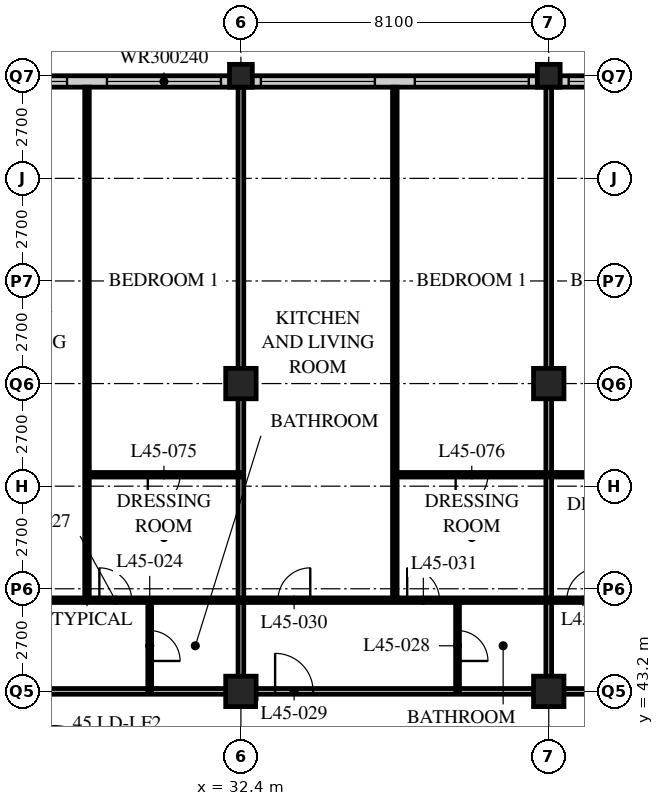
"""IFC4 building model, lengths in metres.
Left out: names, types, materials, properties, quantities, classifications, styles, units other than length and angle.
Written with IfcOpenShell. Run it as: python <this file> out.ifc"""

import sys

from ifc_helpers import new_model, si_unit, direction, frame, frame_2d, origin, origin_2d, place, context, subcontext, project, spatial, rectangle, hollow_rectangle, extrude, element, fill, save


model = new_model("IFC4")
c1 = context("Model", 3, precision=1e-05, world=origin(), true_north=direction((0.0, 1.0)))
c2 = subcontext(c1, "Body", "Model", "MODEL_VIEW")
j1 = project(units=[si_unit("LENGTHUNIT", "METRE"), si_unit("PLANEANGLEUNIT", "RADIAN")], contexts=[c1])
p1 = place(None, origin())
s1 = spatial("IfcSite", under=j1, at=p1, CompositionType="ELEMENT")
p2 = place(p1, origin())
s2 = spatial("IfcBuilding", under=s1, at=p2, CompositionType="ELEMENT")
p3 = place(p2, frame((0.0, 0.0, 177.6)))
s3 = spatial("IfcBuildingStorey", under=s2, at=p3, CompositionType="ELEMENT", Elevation=177.6)
for number, where, z_axis, x_axis in (
    (1, (32.4, 43.2, 0.0), (0.0, 0.0, 1.0), (1.0, 0.0, 0.0)),
    (2, (32.4, 51.3, 0.0), (0.0, 0.0, 1.0), (1.0, 0.0, 0.0)),
):
    element("IfcColumn", number, at=place(p3, frame(where, z_axis=z_axis, x_axis=x_axis)), inside=s3, PredefinedType="COLUMN", context=c2, shape_type="SweptSolid", body=[
        extrude(hollow_rectangle(XDim=0.8, YDim=0.8, WallThickness=0.08, at=origin_2d()), origin(), (0.0, 0.0, 1.0), 3.6),
    ])
p4 = place(p3, frame((32.4, 59.4, 0.0), z_axis=(0.0, 0.0, 1.0), x_axis=(1.0, 0.0, 0.0)))
e3 = element("IfcColumn", 3, at=p4, inside=s3, PredefinedType="COLUMN", context=c2, shape_type="SweptSolid", body=[
    extrude(hollow_rectangle(XDim=0.6, YDim=0.6, WallThickness=0.05, at=origin_2d()), origin(), (0.0, 0.0, 1.0), 3.6),
])
for number, where, z_axis, x_axis in (
    (4, (40.5, 43.2, 0.0), (0.0, 0.0, 1.0), (1.0, 0.0, 0.0)),
    (5, (40.5, 51.3, 0.0), (0.0, 0.0, 1.0), (1.0, 0.0, 0.0)),
):
    element("IfcColumn", number, at=place(p3, frame(where, z_axis=z_axis, x_axis=x_axis)), inside=s3, PredefinedType="COLUMN", context=c2, shape_type="SweptSolid", body=[
        extrude(hollow_rectangle(XDim=0.8, YDim=0.8, WallThickness=0.08, at=origin_2d()), origin(), (0.0, 0.0, 1.0), 3.6),
    ])
p5 = place(p3, frame((40.5, 59.4, 0.0), z_axis=(0.0, 0.0, 1.0), x_axis=(1.0, 0.0, 0.0)))
e6 = element("IfcColumn", 6, at=p5, inside=s3, PredefinedType="COLUMN", context=c2, shape_type="SweptSolid", body=[
    extrude(hollow_rectangle(XDim=0.6, YDim=0.6, WallThickness=0.05, at=origin_2d()), origin(), (0.0, 0.0, 1.0), 3.6),
])
p6 = place(p3, frame((48.3, 59.25, 0.0), z_axis=(0.0, 0.0, 1.0), x_axis=(-1.0, 0.0, 0.0)))
e7 = element("IfcWall", 7, at=p6, inside=s3, PredefinedType="SOLIDWALL", context=c2, shape_type="SweptSolid", body=[
    extrude(rectangle(XDim=40.2, YDim=0.3, at=frame_2d((20.1, 0.0))), origin(), (0.0, 0.0, 1.0), 3.39),
])
p7 = place(p6, frame((0.225, 0.0, 0.6)))
e8 = element("IfcOpeningElement", 8, at=p7, cuts=e7, PredefinedType="OPENING", context=c2, shape_type="SweptSolid", body=[
    extrude(rectangle(XDim=3.0, YDim=2.4, at=frame_2d((1.5, 1.2))), frame((0.0, 0.16, 0.0), z_axis=(0.0, -1.0, 0.0), x_axis=(1.0, 0.0, 0.0)), (0.0, 0.0, 1.0), 0.32),
])
p8 = place(p6, frame((4.275, 0.0, 0.6)))
e9 = element("IfcOpeningElement", 9, at=p8, cuts=e7, PredefinedType="OPENING", context=c2, shape_type="SweptSolid", body=[
    extrude(rectangle(XDim=3.0, YDim=2.4, at=frame_2d((1.5, 1.2))), frame((0.0, 0.16, 0.0), z_axis=(0.0, -1.0, 0.0), x_axis=(1.0, 0.0, 0.0)), (0.0, 0.0, 1.0), 0.32),
])
p9 = place(p6, frame((8.325, 0.0, 0.6)))
e10 = element("IfcOpeningElement", 10, at=p9, cuts=e7, PredefinedType="OPENING", context=c2, shape_type="SweptSolid", body=[
    extrude(rectangle(XDim=3.0, YDim=2.4, at=frame_2d((1.5, 1.2))), frame((0.0, 0.16, 0.0), z_axis=(0.0, -1.0, 0.0), x_axis=(1.0, 0.0, 0.0)), (0.0, 0.0, 1.0), 0.32),
])
p10 = place(p6, frame((12.375, 0.0, 0.6)))
e11 = element("IfcOpeningElement", 11, at=p10, cuts=e7, PredefinedType="OPENING", context=c2, shape_type="SweptSolid", body=[
    extrude(rectangle(XDim=3.0, YDim=2.4, at=frame_2d((1.5, 1.2))), frame((0.0, 0.16, 0.0), z_axis=(0.0, -1.0, 0.0), x_axis=(1.0, 0.0, 0.0)), (0.0, 0.0, 1.0), 0.32),
])
p11 = place(p6, frame((16.425, 0.0, 0.6)))
e12 = element("IfcOpeningElement", 12, at=p11, cuts=e7, PredefinedType="OPENING", context=c2, shape_type="SweptSolid", body=[
    extrude(rectangle(XDim=3.0, YDim=2.4, at=frame_2d((1.5, 1.2))), frame((0.0, 0.16, 0.0), z_axis=(0.0, -1.0, 0.0), x_axis=(1.0, 0.0, 0.0)), (0.0, 0.0, 1.0), 0.32),
])
p12 = place(p6, frame((20.475, 0.0, 0.6)))
e13 = element("IfcOpeningElement", 13, at=p12, cuts=e7, PredefinedType="OPENING", context=c2, shape_type="SweptSolid", body=[
    extrude(rectangle(XDim=3.0, YDim=2.4, at=frame_2d((1.5, 1.2))), frame((0.0, 0.16, 0.0), z_axis=(0.0, -1.0, 0.0), x_axis=(1.0, 0.0, 0.0)), (0.0, 0.0, 1.0), 0.32),
])
p13 = place(p6, frame((24.525, 0.0, 0.6)))
e14 = element("IfcOpeningElement", 14, at=p13, cuts=e7, PredefinedType="OPENING", context=c2, shape_type="SweptSolid", body=[
    extrude(rectangle(XDim=3.0, YDim=2.4, at=frame_2d((1.5, 1.2))), frame((0.0, 0.16, 0.0), z_axis=(0.0, -1.0, 0.0), x_axis=(1.0, 0.0, 0.0)), (0.0, 0.0, 1.0), 0.32),
])
p14 = place(p6, frame((28.575, 0.0, 0.6)))
e15 = element("IfcOpeningElement", 15, at=p14, cuts=e7, PredefinedType="OPENING", context=c2, shape_type="SweptSolid", body=[
    extrude(rectangle(XDim=3.0, YDim=2.4, at=frame_2d((1.5, 1.2))), frame((0.0, 0.16, 0.0), z_axis=(0.0, -1.0, 0.0), x_axis=(1.0, 0.0, 0.0)), (0.0, 0.0, 1.0), 0.32),
])
p15 = place(p6, frame((32.625, 0.0, 0.6)))
e16 = element("IfcOpeningElement", 16, at=p15, cuts=e7, PredefinedType="OPENING", context=c2, shape_type="SweptSolid", body=[
    extrude(rectangle(XDim=3.0, YDim=2.4, at=frame_2d((1.5, 1.2))), frame((0.0, 0.16, 0.0), z_axis=(0.0, -1.0, 0.0), x_axis=(1.0, 0.0, 0.0)), (0.0, 0.0, 1.0), 0.32),
])
p16 = place(p6, frame((36.675, 0.0, 0.6)))
e17 = element("IfcOpeningElement", 17, at=p16, cuts=e7, PredefinedType="OPENING", context=c2, shape_type="SweptSolid", body=[
    extrude(rectangle(XDim=3.0, YDim=2.4, at=frame_2d((1.5, 1.2))), frame((0.0, 0.16, 0.0), z_axis=(0.0, -1.0, 0.0), x_axis=(1.0, 0.0, 0.0)), (0.0, 0.0, 1.0), 0.32),
])
p17 = place(p3, frame((12.15, 43.2, 0.0), z_axis=(0.0, 0.0, 1.0), x_axis=(1.0, 0.0, 0.0)))
e18 = element("IfcWall", 18, at=p17, inside=s3, PredefinedType="PARTITIONING", context=c2, shape_type="SweptSolid", body=[
    extrude(rectangle(XDim=32.4, YDim=0.15, at=frame_2d((16.2, 0.0))), origin(), (0.0, 0.0, 1.0), 2.778),
])
p18 = place(p17, frame((4.95, 0.0, 0.0)))
e19 = element("IfcOpeningElement", 19, at=p18, cuts=e18, PredefinedType="OPENING", context=c2, shape_type="SweptSolid", body=[
    extrude(rectangle(XDim=1.0, YDim=2.1, at=frame_2d((0.5, 1.05))), frame((0.0, 0.085, 0.0), z_axis=(0.0, -1.0, 0.0), x_axis=(1.0, 0.0, 0.0)), (0.0, 0.0, 1.0), 0.17),
])
p19 = place(p17, frame((13.05, 0.0, 0.0)))
e20 = element("IfcOpeningElement", 20, at=p19, cuts=e18, PredefinedType="OPENING", context=c2, shape_type="SweptSolid", body=[
    extrude(rectangle(XDim=1.0, YDim=2.1, at=frame_2d((0.5, 1.05))), frame((0.0, 0.085, 0.0), z_axis=(0.0, -1.0, 0.0), x_axis=(1.0, 0.0, 0.0)), (0.0, 0.0, 1.0), 0.17),
])
p20 = place(p17, frame((21.15, 0.0, 0.0)))
e21 = element("IfcOpeningElement", 21, at=p20, cuts=e18, PredefinedType="OPENING", context=c2, shape_type="SweptSolid", body=[
    extrude(rectangle(XDim=1.0, YDim=2.1, at=frame_2d((0.5, 1.05))), frame((0.0, 0.085, 0.0), z_axis=(0.0, -1.0, 0.0), x_axis=(1.0, 0.0, 0.0)), (0.0, 0.0, 1.0), 0.17),
])
p21 = place(p17, frame((29.875, 0.0, 0.0)))
e22 = element("IfcOpeningElement", 22, at=p21, cuts=e18, PredefinedType="OPENING", context=c2, shape_type="SweptSolid", body=[
    extrude(rectangle(XDim=1.0, YDim=2.1, at=frame_2d((0.5, 1.05))), frame((0.0, 0.085, 0.0), z_axis=(0.0, -1.0, 0.0), x_axis=(1.0, 0.0, 0.0)), (0.0, 0.0, 1.0), 0.17),
])
p22 = place(p17, frame((1.525, 0.0, 0.0)))
e23 = element("IfcOpeningElement", 23, at=p22, cuts=e18, PredefinedType="OPENING", context=c2, shape_type="SweptSolid", body=[
    extrude(rectangle(XDim=1.0, YDim=2.1, at=frame_2d((0.5, 1.05))), frame((0.0, 0.085, 0.0), z_axis=(0.0, -1.0, 0.0), x_axis=(1.0, 0.0, 0.0)), (0.0, 0.0, 1.0), 0.17),
])
p23 = place(p3, frame((30.0, 43.2, 0.0), z_axis=(0.0, 0.0, 1.0), x_axis=(0.0, 1.0, 0.0)))
e24 = element("IfcWall", 24, at=p23, inside=s3, PredefinedType="PARTITIONING", context=c2, shape_type="SweptSolid", body=[
    extrude(rectangle(XDim=2.4, YDim=0.1, at=frame_2d((1.2, 0.0))), origin(), (0.0, 0.0, 1.0), 3.39),
])
p24 = place(p23, frame((0.8, 0.0, 0.0)))
e25 = element("IfcOpeningElement", 25, at=p24, cuts=e24, PredefinedType="OPENING", context=c2, shape_type="SweptSolid", body=[
    extrude(rectangle(XDim=0.8, YDim=2.1, at=frame_2d((0.4, 1.05))), frame((0.0, 0.06, 0.0), z_axis=(0.0, -1.0, 0.0), x_axis=(1.0, 0.0, 0.0)), (0.0, 0.0, 1.0), 0.12),
])
p25 = place(p3, frame((28.35, 45.6, 0.0), z_axis=(0.0, 0.0, 1.0), x_axis=(0.0, 1.0, 0.0)))
e26 = element("IfcWall", 26, at=p25, inside=s3, PredefinedType="PARTITIONING", context=c2, shape_type="SweptSolid", body=[
    extrude(rectangle(XDim=13.5, YDim=0.12, at=frame_2d((6.75, 0.0))), origin(), (0.0, 0.0, 1.0), 3.39),
])
p26 = place(p3, frame((32.4, 43.2, 0.0), z_axis=(0.0, 0.0, 1.0), x_axis=(0.0, 1.0, 0.0)))
e27 = element("IfcWall", 27, at=p26, inside=s3, PredefinedType="PARTITIONING", context=c2, shape_type="SweptSolid", body=[
    extrude(rectangle(XDim=15.9, YDim=0.15, at=frame_2d((7.95, 0.0))), origin(), (0.0, 0.0, 1.0), 2.778),
])
p27 = place(p3, frame((38.1, 43.2, 0.0), z_axis=(0.0, 0.0, 1.0), x_axis=(0.0, 1.0, 0.0)))
e28 = element("IfcWall", 28, at=p27, inside=s3, PredefinedType="PARTITIONING", context=c2, shape_type="SweptSolid", body=[
    extrude(rectangle(XDim=2.4, YDim=0.1, at=frame_2d((1.2, 0.0))), origin(), (0.0, 0.0, 1.0), 3.39),
])
p28 = place(p27, frame((0.8, 0.0, 0.0)))
e29 = element("IfcOpeningElement", 29, at=p28, cuts=e28, PredefinedType="OPENING", context=c2, shape_type="SweptSolid", body=[
    extrude(rectangle(XDim=0.8, YDim=2.1, at=frame_2d((0.4, 1.05))), frame((0.0, 0.06, 0.0), z_axis=(0.0, -1.0, 0.0), x_axis=(1.0, 0.0, 0.0)), (0.0, 0.0, 1.0), 0.12),
])
p29 = place(p3, frame((36.45, 45.6, 0.0), z_axis=(0.0, 0.0, 1.0), x_axis=(0.0, 1.0, 0.0)))
e30 = element("IfcWall", 30, at=p29, inside=s3, PredefinedType="PARTITIONING", context=c2, shape_type="SweptSolid", body=[
    extrude(rectangle(XDim=13.5, YDim=0.12, at=frame_2d((6.75, 0.0))), origin(), (0.0, 0.0, 1.0), 3.39),
])
p30 = place(p3, frame((40.5, 43.2, 0.0), z_axis=(0.0, 0.0, 1.0), x_axis=(0.0, 1.0, 0.0)))
e31 = element("IfcWall", 31, at=p30, inside=s3, PredefinedType="PARTITIONING", context=c2, shape_type="SweptSolid", body=[
    extrude(rectangle(XDim=15.9, YDim=0.15, at=frame_2d((7.95, 0.0))), origin(), (0.0, 0.0, 1.0), 2.778),
])
p31 = place(p3, frame((8.15, 45.6, 0.0), z_axis=(0.0, 0.0, 1.0), x_axis=(1.0, 0.0, 0.0)))
e32 = element("IfcWall", 32, at=p31, inside=s3, PredefinedType="PARTITIONING", context=c2, shape_type="SweptSolid", body=[
    extrude(rectangle(XDim=40.4, YDim=0.12, at=frame_2d((20.2, 0.0))), origin(), (0.0, 0.0, 1.0), 3.39),
])
p32 = place(p31, frame((9.025, 0.0, 0.0)))
e33 = element("IfcOpeningElement", 33, at=p32, cuts=e32, PredefinedType="OPENING", context=c2, shape_type="SweptSolid", body=[
    extrude(rectangle(XDim=0.85, YDim=2.1, at=frame_2d((0.425, 1.05))), frame((0.0, 0.07, 0.0), z_axis=(0.0, -1.0, 0.0), x_axis=(1.0, 0.0, 0.0)), (0.0, 0.0, 1.0), 0.14),
])
p33 = place(p31, frame((12.425, 0.0, 0.0)))
e34 = element("IfcOpeningElement", 34, at=p33, cuts=e32, PredefinedType="OPENING", context=c2, shape_type="SweptSolid", body=[
    extrude(rectangle(XDim=0.85, YDim=2.1, at=frame_2d((0.425, 1.05))), frame((0.0, 0.07, 0.0), z_axis=(0.0, -1.0, 0.0), x_axis=(1.0, 0.0, 0.0)), (0.0, 0.0, 1.0), 0.14),
])
p34 = place(p31, frame((17.125, 0.0, 0.0)))
e35 = element("IfcOpeningElement", 35, at=p34, cuts=e32, PredefinedType="OPENING", context=c2, shape_type="SweptSolid", body=[
    extrude(rectangle(XDim=0.85, YDim=2.1, at=frame_2d((0.425, 1.05))), frame((0.0, 0.07, 0.0), z_axis=(0.0, -1.0, 0.0), x_axis=(1.0, 0.0, 0.0)), (0.0, 0.0, 1.0), 0.14),
])
p35 = place(p31, frame((20.525, 0.0, 0.0)))
e36 = element("IfcOpeningElement", 36, at=p35, cuts=e32, PredefinedType="OPENING", context=c2, shape_type="SweptSolid", body=[
    extrude(rectangle(XDim=0.85, YDim=2.1, at=frame_2d((0.425, 1.05))), frame((0.0, 0.07, 0.0), z_axis=(0.0, -1.0, 0.0), x_axis=(1.0, 0.0, 0.0)), (0.0, 0.0, 1.0), 0.14),
])
p36 = place(p31, frame((25.225, 0.0, 0.0)))
e37 = element("IfcOpeningElement", 37, at=p36, cuts=e32, PredefinedType="OPENING", context=c2, shape_type="SweptSolid", body=[
    extrude(rectangle(XDim=0.85, YDim=2.1, at=frame_2d((0.425, 1.05))), frame((0.0, 0.07, 0.0), z_axis=(0.0, -1.0, 0.0), x_axis=(1.0, 0.0, 0.0)), (0.0, 0.0, 1.0), 0.14),
])
p37 = place(p31, frame((28.625, 0.0, 0.0)))
e38 = element("IfcOpeningElement", 38, at=p37, cuts=e32, PredefinedType="OPENING", context=c2, shape_type="SweptSolid", body=[
    extrude(rectangle(XDim=0.85, YDim=2.1, at=frame_2d((0.425, 1.05))), frame((0.0, 0.07, 0.0), z_axis=(0.0, -1.0, 0.0), x_axis=(1.0, 0.0, 0.0)), (0.0, 0.0, 1.0), 0.14),
])
p38 = place(p31, frame((32.825, 0.0, 0.0)))
e39 = element("IfcOpeningElement", 39, at=p38, cuts=e32, PredefinedType="OPENING", context=c2, shape_type="SweptSolid", body=[
    extrude(rectangle(XDim=0.85, YDim=2.1, at=frame_2d((0.425, 1.05))), frame((0.0, 0.07, 0.0), z_axis=(0.0, -1.0, 0.0), x_axis=(1.0, 0.0, 0.0)), (0.0, 0.0, 1.0), 0.14),
])
p39 = place(p31, frame((36.675, 0.0, 0.0)))
e40 = element("IfcOpeningElement", 40, at=p39, cuts=e32, PredefinedType="OPENING", context=c2, shape_type="SweptSolid", body=[
    extrude(rectangle(XDim=0.85, YDim=2.1, at=frame_2d((0.425, 1.05))), frame((0.0, 0.07, 0.0), z_axis=(0.0, -1.0, 0.0), x_axis=(1.0, 0.0, 0.0)), (0.0, 0.0, 1.0), 0.14),
])
p40 = place(p31, frame((6.725, 0.0, 0.0)))
e41 = element("IfcOpeningElement", 41, at=p40, cuts=e32, PredefinedType="OPENING", context=c2, shape_type="SweptSolid", body=[
    extrude(rectangle(XDim=0.85, YDim=2.1, at=frame_2d((0.425, 1.05))), frame((0.0, 0.07, 0.0), z_axis=(0.0, -1.0, 0.0), x_axis=(1.0, 0.0, 0.0)), (0.0, 0.0, 1.0), 0.14),
])
p41 = place(p31, frame((2.875, 0.0, 0.0)))
e42 = element("IfcOpeningElement", 42, at=p41, cuts=e32, PredefinedType="OPENING", context=c2, shape_type="SweptSolid", body=[
    extrude(rectangle(XDim=0.85, YDim=2.1, at=frame_2d((0.425, 1.05))), frame((0.0, 0.07, 0.0), z_axis=(0.0, -1.0, 0.0), x_axis=(1.0, 0.0, 0.0)), (0.0, 0.0, 1.0), 0.14),
])
p42 = place(p3, frame((28.35, 48.9, 0.0), z_axis=(0.0, 0.0, 1.0), x_axis=(1.0, 0.0, 0.0)))
e43 = element("IfcWall", 43, at=p42, inside=s3, PredefinedType="PARTITIONING", context=c2, shape_type="SweptSolid", body=[
    extrude(rectangle(XDim=4.05, YDim=0.12, at=frame_2d((2.025, 0.0))), origin(), (0.0, 0.0, 1.0), 3.39),
])
p43 = place(p42, frame((1.6, 0.0, 0.0)))
e44 = element("IfcOpeningElement", 44, at=p43, cuts=e43, PredefinedType="OPENING", context=c2, shape_type="SweptSolid", body=[
    extrude(rectangle(XDim=0.85, YDim=2.1, at=frame_2d((0.425, 1.05))), frame((0.0, 0.07, 0.0), z_axis=(0.0, -1.0, 0.0), x_axis=(1.0, 0.0, 0.0)), (0.0, 0.0, 1.0), 0.14),
])
p44 = place(p3, frame((36.45, 48.9, 0.0), z_axis=(0.0, 0.0, 1.0), x_axis=(1.0, 0.0, 0.0)))
e45 = element("IfcWall", 45, at=p44, inside=s3, PredefinedType="PARTITIONING", context=c2, shape_type="SweptSolid", body=[
    extrude(rectangle(XDim=8.1, YDim=0.12, at=frame_2d((4.05, 0.0))), origin(), (0.0, 0.0, 1.0), 3.39),
])
p45 = place(p44, frame((1.6, 0.0, 0.0)))
e46 = element("IfcOpeningElement", 46, at=p45, cuts=e45, PredefinedType="OPENING", context=c2, shape_type="SweptSolid", body=[
    extrude(rectangle(XDim=0.85, YDim=2.1, at=frame_2d((0.425, 1.05))), frame((0.0, 0.07, 0.0), z_axis=(0.0, -1.0, 0.0), x_axis=(1.0, 0.0, 0.0)), (0.0, 0.0, 1.0), 0.14),
])
p46 = place(p44, frame((5.65, 0.0, 0.0)))
e47 = element("IfcOpeningElement", 47, at=p46, cuts=e45, PredefinedType="OPENING", context=c2, shape_type="SweptSolid", body=[
    extrude(rectangle(XDim=0.85, YDim=2.1, at=frame_2d((0.425, 1.05))), frame((0.0, 0.07, 0.0), z_axis=(0.0, -1.0, 0.0), x_axis=(1.0, 0.0, 0.0)), (0.0, 0.0, 1.0), 0.14),
])
p47 = place(p8, origin())
e48 = element("IfcWindow", 48, at=p47, inside=s3, PartitioningType="SINGLE_PANEL", PredefinedType="WINDOW", context=c2, shape_type="SweptSolid", body=[
    extrude(rectangle(XDim=3.0, YDim=2.4, at=frame_2d((1.5, 1.2))), frame((0.0, 0.03, 0.0), z_axis=(0.0, -1.0, 0.0), x_axis=(1.0, 0.0, 0.0)), (0.0, 0.0, 1.0), 0.06),
])
fill(e9, e48)
p48 = place(p9, origin())
e49 = element("IfcWindow", 49, at=p48, inside=s3, PartitioningType="SINGLE_PANEL", PredefinedType="WINDOW", context=c2, shape_type="SweptSolid", body=[
    extrude(rectangle(XDim=3.0, YDim=2.4, at=frame_2d((1.5, 1.2))), frame((0.0, 0.03, 0.0), z_axis=(0.0, -1.0, 0.0), x_axis=(1.0, 0.0, 0.0)), (0.0, 0.0, 1.0), 0.06),
])
fill(e10, e49)
p49 = place(p10, origin())
e50 = element("IfcWindow", 50, at=p49, inside=s3, PartitioningType="SINGLE_PANEL", PredefinedType="WINDOW", context=c2, shape_type="SweptSolid", body=[
    extrude(rectangle(XDim=3.0, YDim=2.4, at=frame_2d((1.5, 1.2))), frame((0.0, 0.03, 0.0), z_axis=(0.0, -1.0, 0.0), x_axis=(1.0, 0.0, 0.0)), (0.0, 0.0, 1.0), 0.06),
])
fill(e11, e50)
p50 = place(p11, origin())
e51 = element("IfcWindow", 51, at=p50, inside=s3, PartitioningType="SINGLE_PANEL", PredefinedType="WINDOW", context=c2, shape_type="SweptSolid", body=[
    extrude(rectangle(XDim=3.0, YDim=2.4, at=frame_2d((1.5, 1.2))), frame((0.0, 0.03, 0.0), z_axis=(0.0, -1.0, 0.0), x_axis=(1.0, 0.0, 0.0)), (0.0, 0.0, 1.0), 0.06),
])
fill(e12, e51)
p51 = place(p12, origin())
e52 = element("IfcWindow", 52, at=p51, inside=s3, PartitioningType="SINGLE_PANEL", PredefinedType="WINDOW", context=c2, shape_type="SweptSolid", body=[
    extrude(rectangle(XDim=3.0, YDim=2.4, at=frame_2d((1.5, 1.2))), frame((0.0, 0.03, 0.0), z_axis=(0.0, -1.0, 0.0), x_axis=(1.0, 0.0, 0.0)), (0.0, 0.0, 1.0), 0.06),
])
fill(e13, e52)
p52 = place(p24, origin())
e53 = element("IfcDoor", 53, at=p52, inside=s3, OperationType="SINGLE_SWING_RIGHT", PredefinedType="DOOR", context=c2, shape_type="SweptSolid", body=[
    extrude(rectangle(XDim=0.8, YDim=2.1, at=frame_2d((0.4, 1.05))), frame((0.0, 0.025, 0.0), z_axis=(0.0, -1.0, 0.0), x_axis=(1.0, 0.0, 0.0)), (0.0, 0.0, 1.0), 0.05),
])
fill(e25, e53)
p53 = place(p35, origin())
e54 = element("IfcDoor", 54, at=p53, inside=s3, OperationType="SINGLE_SWING_LEFT", PredefinedType="DOOR", context=c2, shape_type="SweptSolid", body=[
    extrude(rectangle(XDim=0.85, YDim=2.1, at=frame_2d((0.425, 1.05))), frame((0.0, 0.025, 0.0), z_axis=(0.0, -1.0, 0.0), x_axis=(1.0, 0.0, 0.0)), (0.0, 0.0, 1.0), 0.05),
])
fill(e36, e54)
p54 = place(p28, origin())
e55 = element("IfcDoor", 55, at=p54, inside=s3, OperationType="SINGLE_SWING_RIGHT", PredefinedType="DOOR", context=c2, shape_type="SweptSolid", body=[
    extrude(rectangle(XDim=0.8, YDim=2.1, at=frame_2d((0.4, 1.05))), frame((0.0, 0.025, 0.0), z_axis=(0.0, -1.0, 0.0), x_axis=(1.0, 0.0, 0.0)), (0.0, 0.0, 1.0), 0.05),
])
fill(e29, e55)
p55 = place(p20, origin())
e56 = element("IfcDoor", 56, at=p55, inside=s3, OperationType="SINGLE_SWING_LEFT", PredefinedType="DOOR", context=c2, shape_type="SweptSolid", body=[
    extrude(rectangle(XDim=1.0, YDim=2.1, at=frame_2d((0.5, 1.05))), frame((0.0, 0.025, 0.0), z_axis=(0.0, -1.0, 0.0), x_axis=(1.0, 0.0, 0.0)), (0.0, 0.0, 1.0), 0.05),
])
fill(e21, e56)
p56 = place(p36, origin())
e57 = element("IfcDoor", 57, at=p56, inside=s3, OperationType="SINGLE_SWING_RIGHT", PredefinedType="DOOR", context=c2, shape_type="SweptSolid", body=[
    extrude(rectangle(XDim=0.85, YDim=2.1, at=frame_2d((0.425, 1.05))), frame((0.0, 0.025, 0.0), z_axis=(0.0, -1.0, 0.0), x_axis=(1.0, 0.0, 0.0)), (0.0, 0.0, 1.0), 0.05),
])
fill(e37, e57)
p57 = place(p37, origin())
e58 = element("IfcDoor", 58, at=p57, inside=s3, OperationType="SINGLE_SWING_LEFT", PredefinedType="DOOR", context=c2, shape_type="SweptSolid", body=[
    extrude(rectangle(XDim=0.85, YDim=2.1, at=frame_2d((0.425, 1.05))), frame((0.0, 0.025, 0.0), z_axis=(0.0, -1.0, 0.0), x_axis=(1.0, 0.0, 0.0)), (0.0, 0.0, 1.0), 0.05),
])
fill(e38, e58)
p58 = place(p38, origin())
e59 = element("IfcDoor", 59, at=p58, inside=s3, OperationType="SINGLE_SWING_RIGHT", PredefinedType="DOOR", context=c2, shape_type="SweptSolid", body=[
    extrude(rectangle(XDim=0.85, YDim=2.1, at=frame_2d((0.425, 1.05))), frame((0.0, 0.025, 0.0), z_axis=(0.0, -1.0, 0.0), x_axis=(1.0, 0.0, 0.0)), (0.0, 0.0, 1.0), 0.05),
])
fill(e39, e59)
p59 = place(p43, origin())
e60 = element("IfcDoor", 60, at=p59, inside=s3, OperationType="SINGLE_SWING_RIGHT", PredefinedType="DOOR", context=c2, shape_type="SweptSolid", body=[
    extrude(rectangle(XDim=0.85, YDim=2.1, at=frame_2d((0.425, 1.05))), frame((0.0, 0.025, 0.0), z_axis=(0.0, -1.0, 0.0), x_axis=(1.0, 0.0, 0.0)), (0.0, 0.0, 1.0), 0.05),
])
fill(e44, e60)
p60 = place(p45, origin())
e61 = element("IfcDoor", 61, at=p60, inside=s3, OperationType="SINGLE_SWING_RIGHT", PredefinedType="DOOR", context=c2, shape_type="SweptSolid", body=[
    extrude(rectangle(XDim=0.85, YDim=2.1, at=frame_2d((0.425, 1.05))), frame((0.0, 0.025, 0.0), z_axis=(0.0, -1.0, 0.0), x_axis=(1.0, 0.0, 0.0)), (0.0, 0.0, 1.0), 0.05),
])
fill(e46, e61)
save(model, sys.argv[1])
